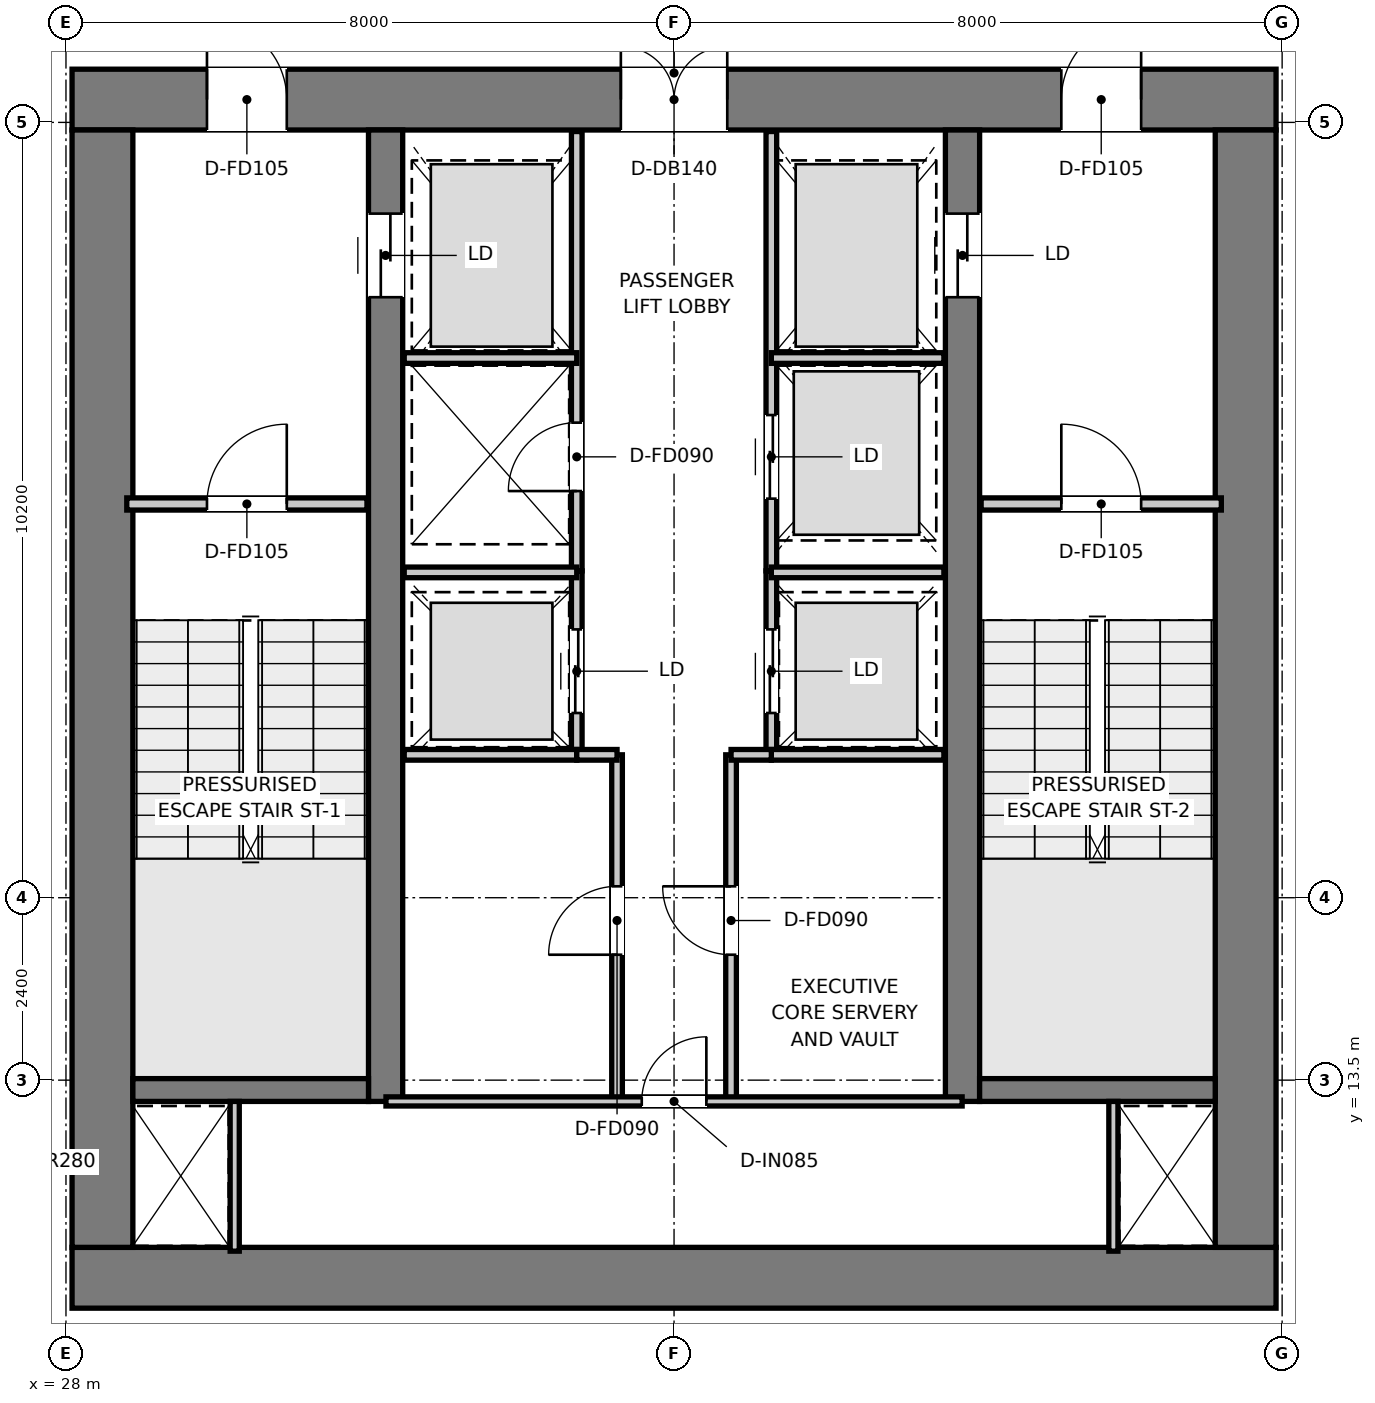
"""IFC4 building model, lengths in metres.
Left out: names, types, materials, properties, quantities, classifications, styles, units other than length and angle.
Written with IfcOpenShell. Run it as: python <this file> out.ifc"""

import sys

from ifc_helpers import new_model, si_unit, direction, frame, frame_2d, origin, place, context, subcontext, project, spatial, rectangle, extrude, element, fill, save


model = new_model("IFC4")
c1 = context("Model", 3, precision=1e-05, world=origin(), true_north=direction((0.0, 1.0)))
c2 = subcontext(c1, "Body", "Model", "MODEL_VIEW")
j1 = project(units=[si_unit("LENGTHUNIT", "METRE"), si_unit("PLANEANGLEUNIT", "RADIAN")], contexts=[c1])
p1 = place(None, origin())
s1 = spatial("IfcSite", under=j1, at=p1, CompositionType="ELEMENT")
p2 = place(p1, origin())
s2 = spatial("IfcBuilding", under=s1, at=p2, CompositionType="ELEMENT")
p3 = place(p2, frame((0.0, 0.0, 306.9)))
s3 = spatial("IfcBuildingStorey", under=s2, at=p3, CompositionType="ELEMENT", Elevation=306.9)
p4 = place(p3, frame((28.08, 10.9, 0.0), z_axis=(0.0, 0.0, 1.0), x_axis=(1.0, 0.0, 0.0)))
e1 = element("IfcWall", 1, at=p4, inside=s3, PredefinedType="SHEAR", context=c2, shape_type="SweptSolid", body=[
    extrude(rectangle(XDim=15.84, YDim=0.8, at=frame_2d((7.92, 0.0))), origin(), (0.0, 0.0, 1.0), 3.95),
])
p5 = place(p3, frame((28.08, 26.4, 0.0), z_axis=(0.0, 0.0, 1.0), x_axis=(1.0, 0.0, 0.0)))
e2 = element("IfcWall", 2, at=p5, inside=s3, PredefinedType="SHEAR", context=c2, shape_type="SweptSolid", body=[
    extrude(rectangle(XDim=15.84, YDim=0.8, at=frame_2d((7.92, 0.0))), origin(), (0.0, 0.0, 1.0), 3.95),
])
p6 = place(p5, frame((7.22, 0.0, 0.0)))
e3 = element("IfcOpeningElement", 3, at=p6, cuts=e2, PredefinedType="OPENING", context=c2, shape_type="SweptSolid", body=[
    extrude(rectangle(XDim=1.4, YDim=2.2, at=frame_2d((0.7, 1.1))), frame((0.0, 0.41, 0.0), z_axis=(0.0, -1.0, 0.0), x_axis=(1.0, 0.0, 0.0)), (0.0, 0.0, 1.0), 0.82),
])
p7 = place(p5, frame((1.775, 0.0, 0.0)))
e4 = element("IfcOpeningElement", 4, at=p7, cuts=e2, PredefinedType="OPENING", context=c2, shape_type="SweptSolid", body=[
    extrude(rectangle(XDim=1.05, YDim=2.1, at=frame_2d((0.525, 1.05))), frame((0.0, 0.41, 0.0), z_axis=(0.0, -1.0, 0.0), x_axis=(1.0, 0.0, 0.0)), (0.0, 0.0, 1.0), 0.82),
])
p8 = place(p5, frame((13.015, 0.0, 0.0)))
e5 = element("IfcOpeningElement", 5, at=p8, cuts=e2, PredefinedType="OPENING", context=c2, shape_type="SweptSolid", body=[
    extrude(rectangle(XDim=1.05, YDim=2.1, at=frame_2d((0.525, 1.05))), frame((0.0, 0.41, 0.0), z_axis=(0.0, -1.0, 0.0), x_axis=(1.0, 0.0, 0.0)), (0.0, 0.0, 1.0), 0.82),
])
for number, where, z_axis, x_axis in (
    (6, (28.48, 11.3, 0.0), (0.0, 0.0, 1.0), (0.0, 1.0, 0.0)),
    (7, (43.52, 11.3, 0.0), (0.0, 0.0, 1.0), (0.0, 1.0, 0.0)),
):
    element("IfcWall", number, at=place(p3, frame(where, z_axis=z_axis, x_axis=x_axis)), inside=s3, PredefinedType="SHEAR", context=c2, shape_type="SweptSolid", body=[
        extrude(rectangle(XDim=14.7, YDim=0.8, at=frame_2d((7.35, 0.0))), origin(), (0.0, 0.0, 1.0), 3.95),
    ])
p9 = place(p3, frame((32.205, 13.22, 0.0), z_axis=(0.0, 0.0, 1.0), x_axis=(0.0, 1.0, 0.0)))
e8 = element("IfcWall", 8, at=p9, inside=s3, PredefinedType="SHEAR", context=c2, shape_type="SweptSolid", body=[
    extrude(rectangle(XDim=12.78, YDim=0.45, at=frame_2d((6.39, 0.0))), origin(), (0.0, 0.0, 1.0), 3.95),
])
p10 = place(p9, frame((10.58, 0.0, 0.0)))
e9 = element("IfcOpeningElement", 9, at=p10, cuts=e8, PredefinedType="OPENING", context=c2, shape_type="SweptSolid", body=[
    extrude(rectangle(XDim=1.1, YDim=2.15, at=frame_2d((0.55, 1.075))), frame((0.0, 0.235, 0.0), z_axis=(0.0, -1.0, 0.0), x_axis=(1.0, 0.0, 0.0)), (0.0, 0.0, 1.0), 0.47),
])
p11 = place(p3, frame((39.795, 13.22, 0.0), z_axis=(0.0, 0.0, 1.0), x_axis=(0.0, 1.0, 0.0)))
e10 = element("IfcWall", 10, at=p11, inside=s3, PredefinedType="SHEAR", context=c2, shape_type="SweptSolid", body=[
    extrude(rectangle(XDim=12.78, YDim=0.45, at=frame_2d((6.39, 0.0))), origin(), (0.0, 0.0, 1.0), 3.95),
])
p12 = place(p11, frame((10.58, 0.0, 0.0)))
e11 = element("IfcOpeningElement", 11, at=p12, cuts=e10, PredefinedType="OPENING", context=c2, shape_type="SweptSolid", body=[
    extrude(rectangle(XDim=1.1, YDim=2.15, at=frame_2d((0.55, 1.075))), frame((0.0, 0.235, 0.0), z_axis=(0.0, -1.0, 0.0), x_axis=(1.0, 0.0, 0.0)), (0.0, 0.0, 1.0), 0.47),
])
for number, where, z_axis, x_axis in (
    (12, (28.88, 13.37, 0.0), (0.0, 0.0, 1.0), (1.0, 0.0, 0.0)),
    (13, (40.02, 13.37, 0.0), (0.0, 0.0, 1.0), (1.0, 0.0, 0.0)),
):
    element("IfcWall", number, at=place(p3, frame(where, z_axis=z_axis, x_axis=x_axis)), inside=s3, PredefinedType="SHEAR", context=c2, shape_type="SweptSolid", body=[
        extrude(rectangle(XDim=3.1, YDim=0.3, at=frame_2d((1.55, 0.0))), origin(), (0.0, 0.0, 1.0), 3.95),
    ])
p13 = place(p3, frame((28.8, 21.08, 0.0), z_axis=(0.0, 0.0, 1.0), x_axis=(1.0, 0.0, 0.0)))
e14 = element("IfcWall", 14, at=p13, inside=s3, PredefinedType="PARTITIONING", context=c2, shape_type="SweptSolid", body=[
    extrude(rectangle(XDim=3.16, YDim=0.16, at=frame_2d((1.58, 0.0))), origin(), (0.0, 0.0, 1.0), 3.67),
])
p14 = place(p13, frame((1.055, 0.0, 0.0)))
e15 = element("IfcOpeningElement", 15, at=p14, cuts=e14, PredefinedType="OPENING", context=c2, shape_type="SweptSolid", body=[
    extrude(rectangle(XDim=1.05, YDim=2.1, at=frame_2d((0.525, 1.05))), frame((0.0, 0.09, 0.0), z_axis=(0.0, -1.0, 0.0), x_axis=(1.0, 0.0, 0.0)), (0.0, 0.0, 1.0), 0.18),
])
p15 = place(p3, frame((40.04, 21.08, 0.0), z_axis=(0.0, 0.0, 1.0), x_axis=(1.0, 0.0, 0.0)))
e16 = element("IfcWall", 16, at=p15, inside=s3, PredefinedType="PARTITIONING", context=c2, shape_type="SweptSolid", body=[
    extrude(rectangle(XDim=3.16, YDim=0.16, at=frame_2d((1.58, 0.0))), origin(), (0.0, 0.0, 1.0), 3.67),
])
p16 = place(p15, frame((1.055, 0.0, 0.0)))
e17 = element("IfcOpeningElement", 17, at=p16, cuts=e16, PredefinedType="OPENING", context=c2, shape_type="SweptSolid", body=[
    extrude(rectangle(XDim=1.05, YDim=2.1, at=frame_2d((0.525, 1.05))), frame((0.0, 0.09, 0.0), z_axis=(0.0, -1.0, 0.0), x_axis=(1.0, 0.0, 0.0)), (0.0, 0.0, 1.0), 0.18),
])
p17 = place(p3, frame((34.72, 20.2, 0.0), z_axis=(0.0, 0.0, 1.0), x_axis=(0.0, 1.0, 0.0)))
e18 = element("IfcWall", 18, at=p17, inside=s3, PredefinedType="PARTITIONING", context=c2, shape_type="SweptSolid", body=[
    extrude(rectangle(XDim=5.78, YDim=0.14, at=frame_2d((2.89, 0.0))), origin(), (0.0, 0.0, 1.0), 2.82),
])
p18 = place(p17, frame((1.05, 0.0, 0.0)))
e19 = element("IfcOpeningElement", 19, at=p18, cuts=e18, PredefinedType="OPENING", context=c2, shape_type="SweptSolid", body=[
    extrude(rectangle(XDim=0.9, YDim=2.1, at=frame_2d((0.45, 1.05))), frame((0.0, 0.08, 0.0), z_axis=(0.0, -1.0, 0.0), x_axis=(1.0, 0.0, 0.0)), (0.0, 0.0, 1.0), 0.16),
])
p19 = place(p3, frame((37.28, 20.2, 0.0), z_axis=(0.0, 0.0, 1.0), x_axis=(0.0, 1.0, 0.0)))
e20 = element("IfcWall", 20, at=p19, inside=s3, PredefinedType="PARTITIONING", context=c2, shape_type="SweptSolid", body=[
    extrude(rectangle(XDim=5.78, YDim=0.14, at=frame_2d((2.89, 0.0))), origin(), (0.0, 0.0, 1.0), 2.82),
])
p20 = place(p19, frame((0.95, 0.0, 0.0)))
e21 = element("IfcOpeningElement", 21, at=p20, cuts=e20, PredefinedType="OPENING", context=c2, shape_type="SweptSolid", body=[
    extrude(rectangle(XDim=1.1, YDim=2.15, at=frame_2d((0.55, 1.075))), frame((0.0, 0.08, 0.0), z_axis=(0.0, -1.0, 0.0), x_axis=(1.0, 0.0, 0.0)), (0.0, 0.0, 1.0), 0.16),
])
for number, where, z_axis, x_axis in (
    (22, (32.45, 23.0, 0.0), (0.0, 0.0, 1.0), (1.0, 0.0, 0.0)),
    (23, (37.28, 23.0, 0.0), (0.0, 0.0, 1.0), (1.0, 0.0, 0.0)),
):
    element("IfcWall", number, at=place(p3, frame(where, z_axis=z_axis, x_axis=x_axis)), inside=s3, PredefinedType="PARTITIONING", context=c2, shape_type="SweptSolid", body=[
        extrude(rectangle(XDim=2.27, YDim=0.14, at=frame_2d((1.135, 0.0))), origin(), (0.0, 0.0, 1.0), 2.82),
    ])
p21 = place(p3, frame((34.72, 17.78, 0.0), z_axis=(0.0, 0.0, 1.0), x_axis=(0.0, 1.0, 0.0)))
e24 = element("IfcWall", 24, at=p21, inside=s3, PredefinedType="PARTITIONING", context=c2, shape_type="SweptSolid", body=[
    extrude(rectangle(XDim=2.42, YDim=0.14, at=frame_2d((1.21, 0.0))), origin(), (0.0, 0.0, 1.0), 3.67),
])
p22 = place(p21, frame((0.55, 0.0, 0.0)))
e25 = element("IfcOpeningElement", 25, at=p22, cuts=e24, PredefinedType="OPENING", context=c2, shape_type="SweptSolid", body=[
    extrude(rectangle(XDim=1.1, YDim=2.15, at=frame_2d((0.55, 1.075))), frame((0.0, 0.08, 0.0), z_axis=(0.0, -1.0, 0.0), x_axis=(1.0, 0.0, 0.0)), (0.0, 0.0, 1.0), 0.16),
])
p23 = place(p3, frame((37.28, 17.78, 0.0), z_axis=(0.0, 0.0, 1.0), x_axis=(0.0, 1.0, 0.0)))
e26 = element("IfcWall", 26, at=p23, inside=s3, PredefinedType="PARTITIONING", context=c2, shape_type="SweptSolid", body=[
    extrude(rectangle(XDim=2.42, YDim=0.14, at=frame_2d((1.21, 0.0))), origin(), (0.0, 0.0, 1.0), 3.67),
])
p24 = place(p23, frame((0.55, 0.0, 0.0)))
e27 = element("IfcOpeningElement", 27, at=p24, cuts=e26, PredefinedType="OPENING", context=c2, shape_type="SweptSolid", body=[
    extrude(rectangle(XDim=1.1, YDim=2.15, at=frame_2d((0.55, 1.075))), frame((0.0, 0.08, 0.0), z_axis=(0.0, -1.0, 0.0), x_axis=(1.0, 0.0, 0.0)), (0.0, 0.0, 1.0), 0.16),
])
for number, where, z_axis, x_axis in (
    (28, (32.45, 17.78, 0.0), (0.0, 0.0, 1.0), (1.0, 0.0, 0.0)),
    (29, (32.45, 20.18, 0.0), (0.0, 0.0, 1.0), (1.0, 0.0, 0.0)),
    (30, (37.28, 17.78, 0.0), (0.0, 0.0, 1.0), (1.0, 0.0, 0.0)),
    (31, (37.28, 20.18, 0.0), (0.0, 0.0, 1.0), (1.0, 0.0, 0.0)),
):
    element("IfcWall", number, at=place(p3, frame(where, z_axis=z_axis, x_axis=x_axis)), inside=s3, PredefinedType="PARTITIONING", context=c2, shape_type="SweptSolid", body=[
        extrude(rectangle(XDim=2.27, YDim=0.14, at=frame_2d((1.135, 0.0))), origin(), (0.0, 0.0, 1.0), 3.67),
    ])
p25 = place(p3, frame((35.25, 13.22, 0.0), z_axis=(0.0, 0.0, 1.0), x_axis=(0.0, 1.0, 0.0)))
e32 = element("IfcWall", 32, at=p25, inside=s3, PredefinedType="PARTITIONING", context=c2, shape_type="SweptSolid", body=[
    extrude(rectangle(XDim=4.56, YDim=0.14, at=frame_2d((2.28, 0.0))), origin(), (0.0, 0.0, 1.0), 3.67),
])
p26 = place(p25, frame((1.93, 0.0, 0.0)))
e33 = element("IfcOpeningElement", 33, at=p26, cuts=e32, PredefinedType="OPENING", context=c2, shape_type="SweptSolid", body=[
    extrude(rectangle(XDim=0.9, YDim=2.1, at=frame_2d((0.45, 1.05))), frame((0.0, 0.08, 0.0), z_axis=(0.0, -1.0, 0.0), x_axis=(1.0, 0.0, 0.0)), (0.0, 0.0, 1.0), 0.16),
])
p27 = place(p3, frame((34.72, 17.78, 0.0), z_axis=(0.0, 0.0, 1.0), x_axis=(1.0, 0.0, 0.0)))
e34 = element("IfcWall", 34, at=p27, inside=s3, PredefinedType="PARTITIONING", context=c2, shape_type="SweptSolid", body=[
    extrude(rectangle(XDim=0.53, YDim=0.14, at=frame_2d((0.265, 0.0))), origin(), (0.0, 0.0, 1.0), 3.67),
])
p28 = place(p3, frame((36.75, 13.22, 0.0), z_axis=(0.0, 0.0, 1.0), x_axis=(0.0, 1.0, 0.0)))
e35 = element("IfcWall", 35, at=p28, inside=s3, PredefinedType="PARTITIONING", context=c2, shape_type="SweptSolid", body=[
    extrude(rectangle(XDim=4.56, YDim=0.14, at=frame_2d((2.28, 0.0))), origin(), (0.0, 0.0, 1.0), 3.67),
])
p29 = place(p28, frame((1.93, 0.0, 0.0)))
e36 = element("IfcOpeningElement", 36, at=p29, cuts=e35, PredefinedType="OPENING", context=c2, shape_type="SweptSolid", body=[
    extrude(rectangle(XDim=0.9, YDim=2.1, at=frame_2d((0.45, 1.05))), frame((0.0, 0.08, 0.0), z_axis=(0.0, -1.0, 0.0), x_axis=(1.0, 0.0, 0.0)), (0.0, 0.0, 1.0), 0.16),
])
p30 = place(p3, frame((36.75, 17.78, 0.0), z_axis=(0.0, 0.0, 1.0), x_axis=(1.0, 0.0, 0.0)))
e37 = element("IfcWall", 37, at=p30, inside=s3, PredefinedType="PARTITIONING", context=c2, shape_type="SweptSolid", body=[
    extrude(rectangle(XDim=0.53, YDim=0.14, at=frame_2d((0.265, 0.0))), origin(), (0.0, 0.0, 1.0), 3.67),
])
for number, where, z_axis, x_axis in (
    (38, (30.22, 11.25, 0.0), (0.0, 0.0, 1.0), (0.0, 1.0, 0.0)),
    (39, (41.78, 11.25, 0.0), (0.0, 0.0, 1.0), (0.0, 1.0, 0.0)),
):
    element("IfcWall", number, at=place(p3, frame(where, z_axis=z_axis, x_axis=x_axis)), inside=s3, PredefinedType="PARTITIONING", context=c2, shape_type="SweptSolid", body=[
        extrude(rectangle(XDim=1.97, YDim=0.12, at=frame_2d((0.985, 0.0))), origin(), (0.0, 0.0, 1.0), 3.67),
    ])
p31 = place(p3, frame((32.21, 13.22, 0.0), z_axis=(0.0, 0.0, 1.0), x_axis=(1.0, 0.0, 0.0)))
e40 = element("IfcWall", 40, at=p31, inside=s3, PredefinedType="PARTITIONING", context=c2, shape_type="SweptSolid", body=[
    extrude(rectangle(XDim=7.58, YDim=0.12, at=frame_2d((3.79, 0.0))), origin(), (0.0, 0.0, 1.0), 3.67),
])
p32 = place(p31, frame((3.365, 0.0, 0.0)))
e41 = element("IfcOpeningElement", 41, at=p32, cuts=e40, PredefinedType="OPENING", context=c2, shape_type="SweptSolid", body=[
    extrude(rectangle(XDim=0.85, YDim=2.1, at=frame_2d((0.425, 1.05))), frame((0.0, 0.07, 0.0), z_axis=(0.0, -1.0, 0.0), x_axis=(1.0, 0.0, 0.0)), (0.0, 0.0, 1.0), 0.14),
])
p33 = place(p14, origin())
e42 = element("IfcDoor", 42, at=p33, inside=s3, OperationType="SINGLE_SWING_RIGHT", PredefinedType="DOOR", context=c2, shape_type="SweptSolid", body=[
    extrude(rectangle(XDim=1.05, YDim=2.1, at=frame_2d((0.525, 1.05))), frame((0.0, 0.025, 0.0), z_axis=(0.0, -1.0, 0.0), x_axis=(1.0, 0.0, 0.0)), (0.0, 0.0, 1.0), 0.05),
])
fill(e15, e42)
p34 = place(p16, origin())
e43 = element("IfcDoor", 43, at=p34, inside=s3, OperationType="SINGLE_SWING_LEFT", PredefinedType="DOOR", context=c2, shape_type="SweptSolid", body=[
    extrude(rectangle(XDim=1.05, YDim=2.1, at=frame_2d((0.525, 1.05))), frame((0.0, 0.025, 0.0), z_axis=(0.0, -1.0, 0.0), x_axis=(1.0, 0.0, 0.0)), (0.0, 0.0, 1.0), 0.05),
])
fill(e17, e43)
p35 = place(p6, origin())
e44 = element("IfcDoor", 44, at=p35, inside=s3, OperationType="DOUBLE_DOOR_SINGLE_SWING", PredefinedType="DOOR", context=c2, shape_type="SweptSolid", body=[
    extrude(rectangle(XDim=1.4, YDim=2.2, at=frame_2d((0.7, 1.1))), frame((0.0, 0.025, 0.0), z_axis=(0.0, -1.0, 0.0), x_axis=(1.0, 0.0, 0.0)), (0.0, 0.0, 1.0), 0.05),
])
fill(e3, e44)
p36 = place(p7, origin())
e45 = element("IfcDoor", 45, at=p36, inside=s3, OperationType="SINGLE_SWING_LEFT", PredefinedType="DOOR", context=c2, shape_type="SweptSolid", body=[
    extrude(rectangle(XDim=1.05, YDim=2.1, at=frame_2d((0.525, 1.05))), frame((0.0, 0.025, 0.0), z_axis=(0.0, -1.0, 0.0), x_axis=(1.0, 0.0, 0.0)), (0.0, 0.0, 1.0), 0.05),
])
fill(e4, e45)
p37 = place(p8, origin())
e46 = element("IfcDoor", 46, at=p37, inside=s3, OperationType="SINGLE_SWING_RIGHT", PredefinedType="DOOR", context=c2, shape_type="SweptSolid", body=[
    extrude(rectangle(XDim=1.05, YDim=2.1, at=frame_2d((0.525, 1.05))), frame((0.0, 0.025, 0.0), z_axis=(0.0, -1.0, 0.0), x_axis=(1.0, 0.0, 0.0)), (0.0, 0.0, 1.0), 0.05),
])
fill(e5, e46)
p38 = place(p10, origin())
e47 = element("IfcDoor", 47, at=p38, inside=s3, OperationType="DOUBLE_DOOR_SLIDING", PredefinedType="DOOR", context=c2, shape_type="SweptSolid", body=[
    extrude(rectangle(XDim=1.1, YDim=2.15, at=frame_2d((0.55, 1.075))), frame((0.0, 0.025, 0.0), z_axis=(0.0, -1.0, 0.0), x_axis=(1.0, 0.0, 0.0)), (0.0, 0.0, 1.0), 0.05),
])
fill(e9, e47)
p39 = place(p12, origin())
e48 = element("IfcDoor", 48, at=p39, inside=s3, OperationType="DOUBLE_DOOR_SLIDING", PredefinedType="DOOR", context=c2, shape_type="SweptSolid", body=[
    extrude(rectangle(XDim=1.1, YDim=2.15, at=frame_2d((0.55, 1.075))), frame((0.0, 0.025, 0.0), z_axis=(0.0, -1.0, 0.0), x_axis=(1.0, 0.0, 0.0)), (0.0, 0.0, 1.0), 0.05),
])
fill(e11, e48)
p40 = place(p18, origin())
e49 = element("IfcDoor", 49, at=p40, inside=s3, OperationType="SINGLE_SWING_LEFT", PredefinedType="DOOR", context=c2, shape_type="SweptSolid", body=[
    extrude(rectangle(XDim=0.9, YDim=2.1, at=frame_2d((0.45, 1.05))), frame((0.0, 0.025, 0.0), z_axis=(0.0, -1.0, 0.0), x_axis=(1.0, 0.0, 0.0)), (0.0, 0.0, 1.0), 0.05),
])
fill(e19, e49)
p41 = place(p20, origin())
e50 = element("IfcDoor", 50, at=p41, inside=s3, OperationType="DOUBLE_DOOR_SLIDING", PredefinedType="DOOR", context=c2, shape_type="SweptSolid", body=[
    extrude(rectangle(XDim=1.1, YDim=2.15, at=frame_2d((0.55, 1.075))), frame((0.0, 0.025, 0.0), z_axis=(0.0, -1.0, 0.0), x_axis=(1.0, 0.0, 0.0)), (0.0, 0.0, 1.0), 0.05),
])
fill(e21, e50)
p42 = place(p22, origin())
e51 = element("IfcDoor", 51, at=p42, inside=s3, OperationType="DOUBLE_DOOR_SLIDING", PredefinedType="DOOR", context=c2, shape_type="SweptSolid", body=[
    extrude(rectangle(XDim=1.1, YDim=2.15, at=frame_2d((0.55, 1.075))), frame((0.0, 0.025, 0.0), z_axis=(0.0, -1.0, 0.0), x_axis=(1.0, 0.0, 0.0)), (0.0, 0.0, 1.0), 0.05),
])
fill(e25, e51)
p43 = place(p24, origin())
e52 = element("IfcDoor", 52, at=p43, inside=s3, OperationType="DOUBLE_DOOR_SLIDING", PredefinedType="DOOR", context=c2, shape_type="SweptSolid", body=[
    extrude(rectangle(XDim=1.1, YDim=2.15, at=frame_2d((0.55, 1.075))), frame((0.0, 0.025, 0.0), z_axis=(0.0, -1.0, 0.0), x_axis=(1.0, 0.0, 0.0)), (0.0, 0.0, 1.0), 0.05),
])
fill(e27, e52)
p44 = place(p26, origin())
e53 = element("IfcDoor", 53, at=p44, inside=s3, OperationType="SINGLE_SWING_LEFT", PredefinedType="DOOR", context=c2, shape_type="SweptSolid", body=[
    extrude(rectangle(XDim=0.9, YDim=2.1, at=frame_2d((0.45, 1.05))), frame((0.0, 0.025, 0.0), z_axis=(0.0, -1.0, 0.0), x_axis=(1.0, 0.0, 0.0)), (0.0, 0.0, 1.0), 0.05),
])
fill(e33, e53)
p45 = place(p29, origin())
e54 = element("IfcDoor", 54, at=p45, inside=s3, OperationType="SINGLE_SWING_RIGHT", PredefinedType="DOOR", context=c2, shape_type="SweptSolid", body=[
    extrude(rectangle(XDim=0.9, YDim=2.1, at=frame_2d((0.45, 1.05))), frame((0.0, 0.025, 0.0), z_axis=(0.0, -1.0, 0.0), x_axis=(1.0, 0.0, 0.0)), (0.0, 0.0, 1.0), 0.05),
])
fill(e36, e54)
p46 = place(p32, origin())
e55 = element("IfcDoor", 55, at=p46, inside=s3, OperationType="SINGLE_SWING_RIGHT", PredefinedType="DOOR", context=c2, shape_type="SweptSolid", body=[
    extrude(rectangle(XDim=0.85, YDim=2.1, at=frame_2d((0.425, 1.05))), frame((0.0, 0.025, 0.0), z_axis=(0.0, -1.0, 0.0), x_axis=(1.0, 0.0, 0.0)), (0.0, 0.0, 1.0), 0.05),
])
fill(e41, e55)
save(model, sys.argv[1])
